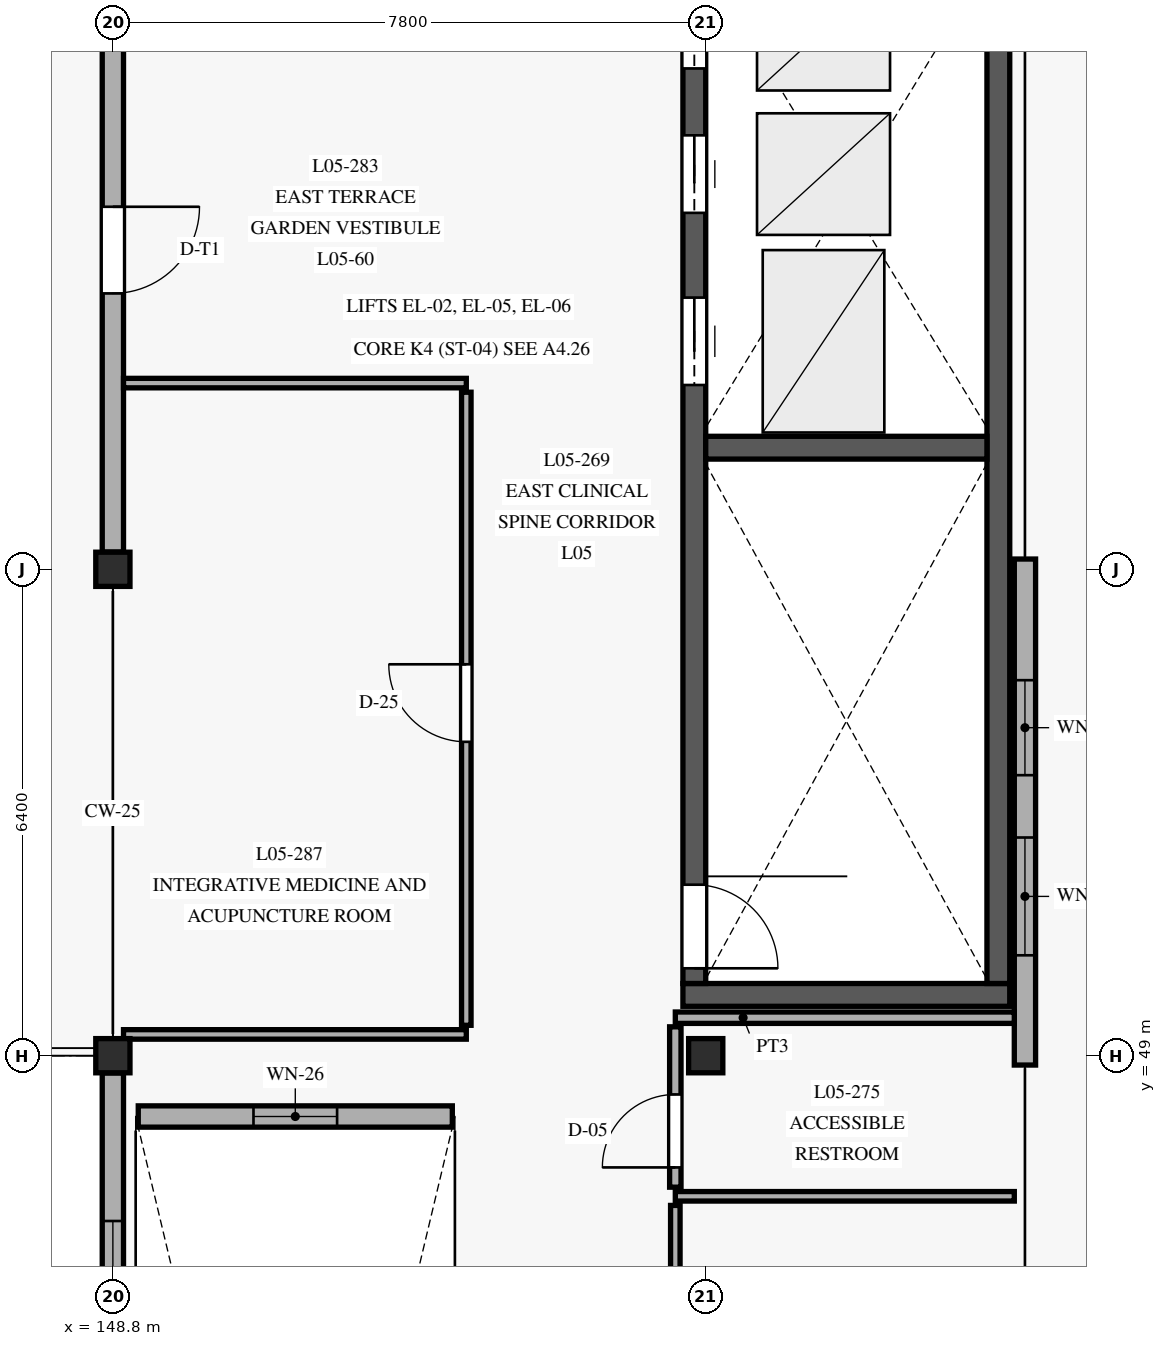
"""IFC4 building model, lengths in metres.
Left out: names, types, materials, properties, quantities, classifications, styles, units other than length and angle.
Written with IfcOpenShell. Run it as: python <this file> out.ifc"""

import sys

from ifc_helpers import new_model, si_unit, direction, frame, frame_2d, origin, origin_with_axes, origin_2d, place, context, subcontext, project, spatial, rectangle, extrude, element, fill, save


model = new_model("IFC4")
c1 = context("Model", 3, precision=1e-05, world=origin(), true_north=direction((0.0, 1.0)))
c2 = subcontext(c1, "Body", "Model", "MODEL_VIEW")
j1 = project(units=[si_unit("LENGTHUNIT", "METRE"), si_unit("PLANEANGLEUNIT", "RADIAN")], contexts=[c1])
p1 = place(None, origin())
s1 = spatial("IfcSite", under=j1, at=p1, CompositionType="ELEMENT")
p2 = place(p1, origin())
s2 = spatial("IfcBuilding", under=s1, at=p2, CompositionType="ELEMENT")
p3 = place(p2, frame((0.0, 0.0, 17.55)))
s3 = spatial("IfcBuildingStorey", under=s2, at=p3, CompositionType="ELEMENT", Elevation=17.55)
for number, where, z_axis, x_axis in (
    (1, (148.8, 49.0, 0.0), (0.0, 0.0, 1.0), (1.0, 0.0, 0.0)),
    (2, (148.8, 55.4, 0.0), (0.0, 0.0, 1.0), (1.0, 0.0, 0.0)),
    (3, (156.6, 49.0, 0.0), (0.0, 0.0, 1.0), (1.0, 0.0, 0.0)),
):
    element("IfcColumn", number, at=place(p3, frame(where, z_axis=z_axis, x_axis=x_axis)), inside=s3, PredefinedType="COLUMN", context=c2, shape_type="SweptSolid", body=[
        extrude(rectangle(XDim=0.45, YDim=0.45, at=origin_2d()), origin(), (0.0, 0.0, 1.0), 4.05),
    ])
p4 = place(p3, frame((156.3, 49.8, 0.0), z_axis=(0.0, 0.0, 1.0), x_axis=(1.0, 0.0, 0.0)))
e4 = element("IfcWall", 4, at=p4, inside=s3, PredefinedType="SHEAR", context=c2, shape_type="SweptSolid", body=[
    extrude(rectangle(XDim=4.3, YDim=0.3, at=frame_2d((2.15, 0.0))), origin(), (0.0, 0.0, 1.0), 3.84),
])
p5 = place(p3, frame((156.45, 63.45, 0.0), z_axis=(0.0, 0.0, 1.0), x_axis=(0.0, -1.0, 0.0)))
e5 = element("IfcWall", 5, at=p5, inside=s3, PredefinedType="SHEAR", context=c2, shape_type="SweptSolid", body=[
    extrude(rectangle(XDim=13.5, YDim=0.3, at=frame_2d((6.75, 0.0))), origin(), (0.0, 0.0, 1.0), 3.84),
])
p6 = place(p5, frame((12.2, 0.0, 0.0)))
e6 = element("IfcOpeningElement", 6, at=p6, cuts=e5, PredefinedType="OPENING", context=c2, shape_type="SweptSolid", body=[
    extrude(rectangle(XDim=1.1, YDim=2.2, at=frame_2d((0.55, 1.1))), frame((0.0, 0.16, 0.0), z_axis=(0.0, -1.0, 0.0), x_axis=(1.0, 0.0, 0.0)), (0.0, 0.0, 1.0), 0.32),
])
p7 = place(p5, frame((4.475, 0.0, 0.0)))
e7 = element("IfcOpeningElement", 7, at=p7, cuts=e5, PredefinedType="OPENING", context=c2, shape_type="SweptSolid", body=[
    extrude(rectangle(XDim=1.15, YDim=2.2, at=frame_2d((0.575, 1.1))), frame((0.0, 0.16, 0.0), z_axis=(0.0, -1.0, 0.0), x_axis=(1.0, 0.0, 0.0)), (0.0, 0.0, 1.0), 0.32),
])
p8 = place(p5, frame((2.34, 0.0, 0.0)))
e8 = element("IfcOpeningElement", 8, at=p8, cuts=e5, PredefinedType="OPENING", context=c2, shape_type="SweptSolid", body=[
    extrude(rectangle(XDim=1.02, YDim=2.15, at=frame_2d((0.51, 1.075))), frame((0.0, 0.16, 0.0), z_axis=(0.0, -1.0, 0.0), x_axis=(1.0, 0.0, 0.0)), (0.0, 0.0, 1.0), 0.32),
])
p9 = place(p5, frame((0.44, 0.0, 0.0)))
e9 = element("IfcOpeningElement", 9, at=p9, cuts=e5, PredefinedType="OPENING", context=c2, shape_type="SweptSolid", body=[
    extrude(rectangle(XDim=1.02, YDim=2.15, at=frame_2d((0.51, 1.075))), frame((0.0, 0.16, 0.0), z_axis=(0.0, -1.0, 0.0), x_axis=(1.0, 0.0, 0.0)), (0.0, 0.0, 1.0), 0.32),
])
p10 = place(p3, frame((160.45, 49.95, 0.0), z_axis=(0.0, 0.0, 1.0), x_axis=(0.0, 1.0, 0.0)))
e10 = element("IfcWall", 10, at=p10, inside=s3, PredefinedType="SHEAR", context=c2, shape_type="SweptSolid", body=[
    extrude(rectangle(XDim=13.5, YDim=0.3, at=frame_2d((6.75, 0.0))), origin(), (0.0, 0.0, 1.0), 3.84),
])
p11 = place(p3, frame((156.6, 57.0, 0.0), z_axis=(0.0, 0.0, 1.0), x_axis=(1.0, 0.0, 0.0)))
e11 = element("IfcWall", 11, at=p11, inside=s3, PredefinedType="SHEAR", context=c2, shape_type="SweptSolid", body=[
    extrude(rectangle(XDim=3.7, YDim=0.3, at=frame_2d((1.85, 0.0))), origin(), (0.0, 0.0, 1.0), 3.84),
])
p12 = place(p3, frame((160.8, 48.877, 0.0), z_axis=(0.0, 0.0, 1.0), x_axis=(0.0, 1.0, 0.0)))
e12 = element("IfcWall", 12, at=p12, inside=s3, PredefinedType="SOLIDWALL", context=c2, shape_type="SweptSolid", body=[
    extrude(rectangle(XDim=6.658, YDim=0.28, at=frame_2d((3.329, 0.0))), origin(), (0.0, 0.0, 1.0), 3.84),
])
p13 = place(p12, frame((1.444, 0.0, 0.85)))
e13 = element("IfcOpeningElement", 13, at=p13, cuts=e12, PredefinedType="OPENING", context=c2, shape_type="SweptSolid", body=[
    extrude(rectangle(XDim=1.55, YDim=1.75, at=frame_2d((0.775, 0.875))), frame((0.0, 0.15, 0.0), z_axis=(0.0, -1.0, 0.0), x_axis=(1.0, 0.0, 0.0)), (0.0, 0.0, 1.0), 0.3),
])
p14 = place(p12, frame((3.814, 0.0, 0.85)))
e14 = element("IfcOpeningElement", 14, at=p14, cuts=e12, PredefinedType="OPENING", context=c2, shape_type="SweptSolid", body=[
    extrude(rectangle(XDim=1.25, YDim=1.75, at=frame_2d((0.625, 0.875))), frame((0.0, 0.15, 0.0), z_axis=(0.0, -1.0, 0.0), x_axis=(1.0, 0.0, 0.0)), (0.0, 0.0, 1.0), 0.3),
])
p15 = place(p3, frame((148.8, 48.773, 0.0), z_axis=(0.0, 0.0, 1.0), x_axis=(0.0, -1.0, 0.0)))
e15 = element("IfcWall", 15, at=p15, inside=s3, PredefinedType="SOLIDWALL", context=c2, shape_type="SweptSolid", body=[
    extrude(rectangle(XDim=5.946, YDim=0.28, at=frame_2d((2.973, 0.0))), origin(), (0.0, 0.0, 1.0), 3.46),
])
p16 = place(p15, frame((1.948, 0.0, 0.8)))
e16 = element("IfcOpeningElement", 16, at=p16, cuts=e15, PredefinedType="OPENING", context=c2, shape_type="SweptSolid", body=[
    extrude(rectangle(XDim=2.05, YDim=1.95, at=frame_2d((1.025, 0.975))), frame((0.0, 0.15, 0.0), z_axis=(0.0, -1.0, 0.0), x_axis=(1.0, 0.0, 0.0)), (0.0, 0.0, 1.0), 0.3),
])
p17 = place(p3, frame((148.8, 63.573, 0.0), z_axis=(0.0, 0.0, 1.0), x_axis=(0.0, -1.0, 0.0)))
e17 = element("IfcWall", 17, at=p17, inside=s3, PredefinedType="SOLIDWALL", context=c2, shape_type="SweptSolid", body=[
    extrude(rectangle(XDim=7.946, YDim=0.28, at=frame_2d((3.973, 0.0))), origin(), (0.0, 0.0, 1.0), 3.46),
])
p18 = place(p17, frame((3.403, 0.0, 0.0)))
e18 = element("IfcOpeningElement", 18, at=p18, cuts=e17, PredefinedType="OPENING", context=c2, shape_type="SweptSolid", body=[
    extrude(rectangle(XDim=1.14, YDim=2.3, at=frame_2d((0.57, 1.15))), frame((0.0, 0.15, 0.0), z_axis=(0.0, -1.0, 0.0), x_axis=(1.0, 0.0, 0.0)), (0.0, 0.0, 1.0), 0.3),
])
p19 = place(p3, frame((149.134, 48.2, 0.0), z_axis=(0.0, 0.0, 1.0), x_axis=(1.0, 0.0, 0.0)))
e19 = element("IfcWall", 19, at=p19, inside=s3, PredefinedType="SOLIDWALL", context=c2, shape_type="SweptSolid", body=[
    extrude(rectangle(XDim=4.132, YDim=0.28, at=frame_2d((2.066, 0.0))), origin(), (0.0, 0.0, 1.0), 3.84),
])
p20 = place(p19, frame((1.516, 0.0, 0.85)))
e20 = element("IfcOpeningElement", 20, at=p20, cuts=e19, PredefinedType="OPENING", context=c2, shape_type="SweptSolid", body=[
    extrude(rectangle(XDim=1.1, YDim=1.8, at=frame_2d((0.55, 0.9))), frame((0.0, 0.15, 0.0), z_axis=(0.0, -1.0, 0.0), x_axis=(1.0, 0.0, 0.0)), (0.0, 0.0, 1.0), 0.3),
])
p21 = place(p3, frame((156.2, 35.9, 0.0), z_axis=(0.0, 0.0, 1.0), x_axis=(0.0, 1.0, 0.0)))
e21 = element("IfcWall", 21, at=p21, inside=s3, PredefinedType="PARTITIONING", context=c2, shape_type="SweptSolid", body=[
    extrude(rectangle(XDim=11.13, YDim=0.125, at=frame_2d((5.565, 0.0))), origin(), (0.0, 0.0, 1.0), 3.835),
])
p22 = place(p21, frame((4.963, 0.0, 0.0)))
e22 = element("IfcOpeningElement", 22, at=p22, cuts=e21, PredefinedType="OPENING", context=c2, shape_type="SweptSolid", body=[
    extrude(rectangle(XDim=0.9, YDim=2.12, at=frame_2d((0.45, 1.06))), frame((0.0, 0.073, 0.0), z_axis=(0.0, -1.0, 0.0), x_axis=(1.0, 0.0, 0.0)), (0.0, 0.0, 1.0), 0.145),
])
p23 = place(p3, frame((156.2, 47.15, 0.0), z_axis=(0.0, 0.0, 1.0), x_axis=(1.0, 0.0, 0.0)))
e23 = element("IfcWall", 23, at=p23, inside=s3, PredefinedType="PARTITIONING", context=c2, shape_type="SweptSolid", body=[
    extrude(rectangle(XDim=4.46, YDim=0.125, at=frame_2d((2.23, 0.0))), origin(), (0.0, 0.0, 1.0), 3.455),
])
p24 = place(p3, frame((156.2, 47.27, 0.0), z_axis=(0.0, 0.0, 1.0), x_axis=(0.0, 1.0, 0.0)))
e24 = element("IfcWall", 24, at=p24, inside=s3, PredefinedType="PARTITIONING", context=c2, shape_type="SweptSolid", body=[
    extrude(rectangle(XDim=2.11, YDim=0.15, at=frame_2d((1.055, 0.0))), origin(), (0.0, 0.0, 1.0), 3.435),
])
p25 = place(p24, frame((0.26, 0.0, 0.0)))
e25 = element("IfcOpeningElement", 25, at=p25, cuts=e24, PredefinedType="OPENING", context=c2, shape_type="SweptSolid", body=[
    extrude(rectangle(XDim=0.96, YDim=2.1, at=frame_2d((0.48, 1.05))), frame((0.0, 0.085, 0.0), z_axis=(0.0, -1.0, 0.0), x_axis=(1.0, 0.0, 0.0)), (0.0, 0.0, 1.0), 0.17),
])
p26 = place(p3, frame((156.2, 49.5, 0.0), z_axis=(0.0, 0.0, 1.0), x_axis=(1.0, 0.0, 0.0)))
e26 = element("IfcWall", 26, at=p26, inside=s3, PredefinedType="PARTITIONING", context=c2, shape_type="SweptSolid", body=[
    extrude(rectangle(XDim=4.46, YDim=0.15, at=frame_2d((2.23, 0.0))), origin(), (0.0, 0.0, 1.0), 3.835),
])
p27 = place(p3, frame((153.45, 49.4, 0.0), z_axis=(0.0, 0.0, 1.0), x_axis=(0.0, 1.0, 0.0)))
e27 = element("IfcWall", 27, at=p27, inside=s3, PredefinedType="PARTITIONING", context=c2, shape_type="SweptSolid", body=[
    extrude(rectangle(XDim=8.33, YDim=0.125, at=frame_2d((4.165, 0.0))), origin(), (0.0, 0.0, 1.0), 3.435),
])
p28 = place(p27, frame((3.73, 0.0, 0.0)))
e28 = element("IfcOpeningElement", 28, at=p28, cuts=e27, PredefinedType="OPENING", context=c2, shape_type="SweptSolid", body=[
    extrude(rectangle(XDim=1.02, YDim=2.18, at=frame_2d((0.51, 1.09))), frame((0.0, 0.073, 0.0), z_axis=(0.0, -1.0, 0.0), x_axis=(1.0, 0.0, 0.0)), (0.0, 0.0, 1.0), 0.145),
])
p29 = place(p3, frame((148.94, 49.28, 0.0), z_axis=(0.0, 0.0, 1.0), x_axis=(1.0, 0.0, 0.0)))
e29 = element("IfcWall", 29, at=p29, inside=s3, PredefinedType="PARTITIONING", context=c2, shape_type="SweptSolid", body=[
    extrude(rectangle(XDim=4.51, YDim=0.125, at=frame_2d((2.255, 0.0))), origin(), (0.0, 0.0, 1.0), 3.435),
])
p30 = place(p3, frame((148.94, 57.85, 0.0), z_axis=(0.0, 0.0, 1.0), x_axis=(1.0, 0.0, 0.0)))
e30 = element("IfcWall", 30, at=p30, inside=s3, PredefinedType="PARTITIONING", context=c2, shape_type="SweptSolid", body=[
    extrude(rectangle(XDim=4.51, YDim=0.125, at=frame_2d((2.255, 0.0))), origin(), (0.0, 0.0, 1.0), 3.455),
])
p31 = place(p6, origin_with_axes())
e31 = element("IfcDoor", 31, at=p31, inside=s3, OperationType="SINGLE_SWING_RIGHT", PredefinedType="DOOR", context=c2, shape_type="SweptSolid", body=[
    extrude(rectangle(XDim=1.1, YDim=2.2, at=frame_2d((0.55, 1.1))), frame((0.0, 0.025, 0.0), z_axis=(0.0, -1.0, 0.0), x_axis=(1.0, 0.0, 0.0)), (0.0, 0.0, 1.0), 0.05),
])
fill(e6, e31)
p32 = place(p7, origin_with_axes())
e32 = element("IfcDoor", 32, at=p32, inside=s3, OperationType="SLIDING_TO_LEFT", PredefinedType="DOOR", context=c2, shape_type="SweptSolid", body=[
    extrude(rectangle(XDim=1.15, YDim=2.2, at=frame_2d((0.575, 1.1))), frame((0.0, 0.025, 0.0), z_axis=(0.0, -1.0, 0.0), x_axis=(1.0, 0.0, 0.0)), (0.0, 0.0, 1.0), 0.05),
])
fill(e7, e32)
p33 = place(p8, origin_with_axes())
e33 = element("IfcDoor", 33, at=p33, inside=s3, OperationType="SLIDING_TO_LEFT", PredefinedType="DOOR", context=c2, shape_type="SweptSolid", body=[
    extrude(rectangle(XDim=1.02, YDim=2.15, at=frame_2d((0.51, 1.075))), frame((0.0, 0.025, 0.0), z_axis=(0.0, -1.0, 0.0), x_axis=(1.0, 0.0, 0.0)), (0.0, 0.0, 1.0), 0.05),
])
fill(e8, e33)
p34 = place(p9, origin_with_axes())
e34 = element("IfcDoor", 34, at=p34, inside=s3, OperationType="SLIDING_TO_LEFT", PredefinedType="DOOR", context=c2, shape_type="SweptSolid", body=[
    extrude(rectangle(XDim=1.02, YDim=2.15, at=frame_2d((0.51, 1.075))), frame((0.0, 0.025, 0.0), z_axis=(0.0, -1.0, 0.0), x_axis=(1.0, 0.0, 0.0)), (0.0, 0.0, 1.0), 0.05),
])
fill(e9, e34)
p35 = place(p13, origin_with_axes())
e35 = element("IfcWindow", 35, at=p35, inside=s3, PartitioningType="SINGLE_PANEL", PredefinedType="WINDOW", context=c2, shape_type="SweptSolid", body=[
    extrude(rectangle(XDim=1.55, YDim=1.75, at=frame_2d((0.775, 0.875))), frame((0.0, 0.03, 0.0), z_axis=(0.0, -1.0, 0.0), x_axis=(1.0, 0.0, 0.0)), (0.0, 0.0, 1.0), 0.06),
])
fill(e13, e35)
p36 = place(p14, origin_with_axes())
e36 = element("IfcWindow", 36, at=p36, inside=s3, PartitioningType="SINGLE_PANEL", PredefinedType="WINDOW", context=c2, shape_type="SweptSolid", body=[
    extrude(rectangle(XDim=1.25, YDim=1.75, at=frame_2d((0.625, 0.875))), frame((0.0, 0.03, 0.0), z_axis=(0.0, -1.0, 0.0), x_axis=(1.0, 0.0, 0.0)), (0.0, 0.0, 1.0), 0.06),
])
fill(e14, e36)
p37 = place(p16, origin_with_axes())
e37 = element("IfcWindow", 37, at=p37, inside=s3, PartitioningType="SINGLE_PANEL", PredefinedType="WINDOW", context=c2, shape_type="SweptSolid", body=[
    extrude(rectangle(XDim=2.05, YDim=1.95, at=frame_2d((1.025, 0.975))), frame((0.0, 0.03, 0.0), z_axis=(0.0, -1.0, 0.0), x_axis=(1.0, 0.0, 0.0)), (0.0, 0.0, 1.0), 0.06),
])
fill(e16, e37)
p38 = place(p18, frame((1.14, 0.0, 0.0), z_axis=(0.0, 0.0, 1.0), x_axis=(-1.0, 0.0, 0.0)))
e38 = element("IfcDoor", 38, at=p38, inside=s3, OperationType="SINGLE_SWING_RIGHT", PredefinedType="DOOR", context=c2, shape_type="SweptSolid", body=[
    extrude(rectangle(XDim=1.14, YDim=2.3, at=frame_2d((0.57, 1.15))), frame((0.0, 0.025, 0.0), z_axis=(0.0, -1.0, 0.0), x_axis=(1.0, 0.0, 0.0)), (0.0, 0.0, 1.0), 0.05),
])
fill(e18, e38)
p39 = place(p20, origin_with_axes())
e39 = element("IfcWindow", 39, at=p39, inside=s3, PartitioningType="SINGLE_PANEL", PredefinedType="WINDOW", context=c2, shape_type="SweptSolid", body=[
    extrude(rectangle(XDim=1.1, YDim=1.8, at=frame_2d((0.55, 0.9))), frame((0.0, 0.03, 0.0), z_axis=(0.0, -1.0, 0.0), x_axis=(1.0, 0.0, 0.0)), (0.0, 0.0, 1.0), 0.06),
])
fill(e20, e39)
p40 = place(p25, frame((0.96, 0.0, 0.0), z_axis=(0.0, 0.0, 1.0), x_axis=(-1.0, 0.0, 0.0)))
e40 = element("IfcDoor", 40, at=p40, inside=s3, OperationType="SINGLE_SWING_RIGHT", PredefinedType="DOOR", context=c2, shape_type="SweptSolid", body=[
    extrude(rectangle(XDim=0.96, YDim=2.1, at=frame_2d((0.48, 1.05))), frame((0.0, 0.025, 0.0), z_axis=(0.0, -1.0, 0.0), x_axis=(1.0, 0.0, 0.0)), (0.0, 0.0, 1.0), 0.05),
])
fill(e25, e40)
p41 = place(p28, origin_with_axes())
e41 = element("IfcDoor", 41, at=p41, inside=s3, OperationType="SINGLE_SWING_RIGHT", PredefinedType="DOOR", context=c2, shape_type="SweptSolid", body=[
    extrude(rectangle(XDim=1.02, YDim=2.18, at=frame_2d((0.51, 1.09))), frame((0.0, 0.025, 0.0), z_axis=(0.0, -1.0, 0.0), x_axis=(1.0, 0.0, 0.0)), (0.0, 0.0, 1.0), 0.05),
])
fill(e28, e41)
save(model, sys.argv[1])
